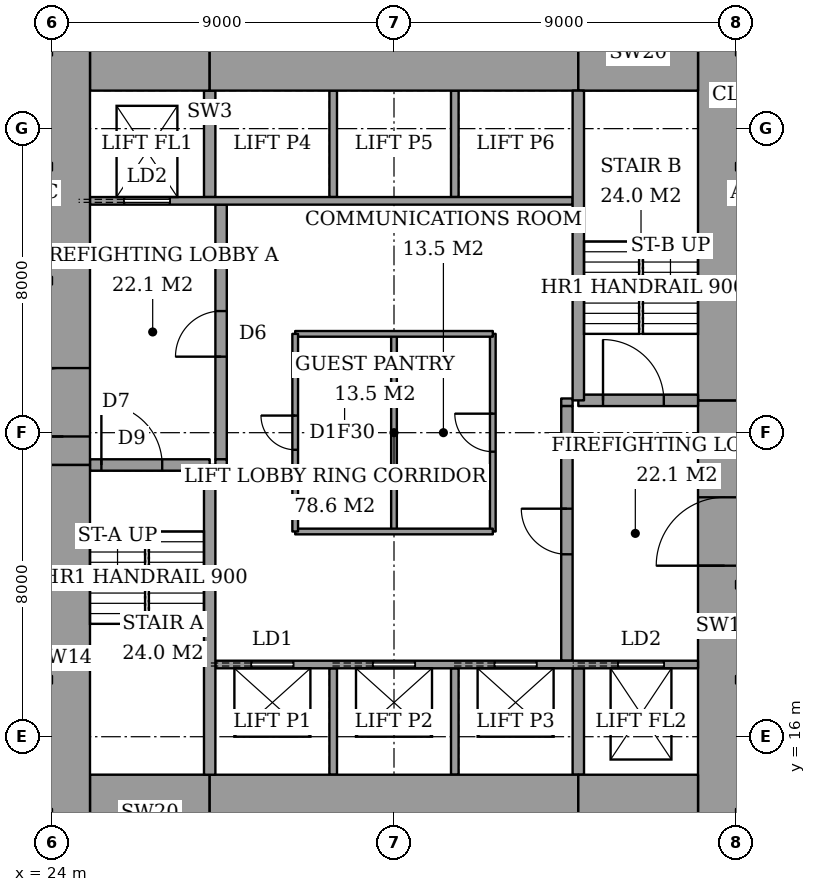
"""IFC4 building model, lengths in metres.
Left out: names, types, materials, properties, quantities, classifications, styles, units other than length and angle.
Written with IfcOpenShell. Run it as: python <this file> out.ifc"""

import sys

from ifc_helpers import new_model, si_unit, direction, frame, frame_2d, origin, place, context, subcontext, project, spatial, rectangle, extrude, element, fill, save


model = new_model("IFC4")
c1 = context("Model", 3, precision=1e-05, world=origin(), true_north=direction((0.0, 1.0)))
c2 = subcontext(c1, "Body", "Model", "MODEL_VIEW")
j1 = project(units=[si_unit("LENGTHUNIT", "METRE"), si_unit("PLANEANGLEUNIT", "RADIAN")], contexts=[c1])
p1 = place(None, origin())
s1 = spatial("IfcSite", under=j1, at=p1, CompositionType="ELEMENT")
p2 = place(p1, origin())
s2 = spatial("IfcBuilding", under=s1, at=p2, CompositionType="ELEMENT")
p3 = place(p2, frame((0.0, 0.0, 26.0)))
s3 = spatial("IfcBuildingStorey", under=s2, at=p3, CompositionType="ELEMENT", Elevation=26.0)
p4 = place(p3, frame((25.0, 14.0, 0.0), z_axis=(0.0, 0.0, 1.0), x_axis=(1.0, 0.0, 0.0)))
e1 = element("IfcWall", 1, at=p4, inside=s3, PredefinedType="SHEAR", context=c2, shape_type="SweptSolid", body=[
    extrude(rectangle(XDim=3.15, YDim=2.0, at=frame_2d((1.575, 0.0))), origin(), (0.0, 0.0, 1.0), 3.6),
])
p5 = place(p3, frame((28.15, 14.0, 0.0), z_axis=(0.0, 0.0, 1.0), x_axis=(1.0, 0.0, 0.0)))
e2 = element("IfcWall", 2, at=p5, inside=s3, PredefinedType="SHEAR", context=c2, shape_type="SweptSolid", body=[
    extrude(rectangle(XDim=9.7, YDim=2.0, at=frame_2d((4.85, 0.0))), origin(), (0.0, 0.0, 1.0), 3.6),
])
for number, where, z_axis, x_axis in (
    (3, (37.85, 14.0, 0.0), (0.0, 0.0, 1.0), (1.0, 0.0, 0.0)),
    (4, (25.0, 34.0, 0.0), (0.0, 0.0, 1.0), (1.0, 0.0, 0.0)),
):
    element("IfcWall", number, at=place(p3, frame(where, z_axis=z_axis, x_axis=x_axis)), inside=s3, PredefinedType="SHEAR", context=c2, shape_type="SweptSolid", body=[
        extrude(rectangle(XDim=3.15, YDim=2.0, at=frame_2d((1.575, 0.0))), origin(), (0.0, 0.0, 1.0), 3.6),
    ])
p6 = place(p3, frame((28.15, 34.0, 0.0), z_axis=(0.0, 0.0, 1.0), x_axis=(1.0, 0.0, 0.0)))
e5 = element("IfcWall", 5, at=p6, inside=s3, PredefinedType="SHEAR", context=c2, shape_type="SweptSolid", body=[
    extrude(rectangle(XDim=9.7, YDim=2.0, at=frame_2d((4.85, 0.0))), origin(), (0.0, 0.0, 1.0), 3.6),
])
p7 = place(p3, frame((37.85, 34.0, 0.0), z_axis=(0.0, 0.0, 1.0), x_axis=(1.0, 0.0, 0.0)))
e6 = element("IfcWall", 6, at=p7, inside=s3, PredefinedType="SHEAR", context=c2, shape_type="SweptSolid", body=[
    extrude(rectangle(XDim=3.15, YDim=2.0, at=frame_2d((1.575, 0.0))), origin(), (0.0, 0.0, 1.0), 3.6),
])
p8 = place(p3, frame((24.3, 13.0, 0.0), z_axis=(0.0, 0.0, 1.0), x_axis=(0.0, 1.0, 0.0)))
e7 = element("IfcWall", 7, at=p8, inside=s3, PredefinedType="SHEAR", context=c2, shape_type="SweptSolid", body=[
    extrude(rectangle(XDim=10.15, YDim=1.4, at=frame_2d((5.075, 0.0))), origin(), (0.0, 0.0, 1.0), 3.6),
])
p9 = place(p3, frame((24.3, 23.15, 0.0), z_axis=(0.0, 0.0, 1.0), x_axis=(0.0, 1.0, 0.0)))
e8 = element("IfcWall", 8, at=p9, inside=s3, PredefinedType="SHEAR", context=c2, shape_type="SweptSolid", body=[
    extrude(rectangle(XDim=11.85, YDim=1.4, at=frame_2d((5.925, 0.0))), origin(), (0.0, 0.0, 1.0), 3.6),
])
p10 = place(p9, frame((0.75, 0.0, 0.0)))
e9 = element("IfcOpeningElement", 9, at=p10, cuts=e8, PredefinedType="OPENING", context=c2, shape_type="SweptSolid", body=[
    extrude(rectangle(XDim=1.8, YDim=2.4, at=frame_2d((0.9, 1.2))), frame((0.0, 0.71, 0.0), z_axis=(0.0, -1.0, 0.0), x_axis=(1.0, 0.0, 0.0)), (0.0, 0.0, 1.0), 1.42),
])
p11 = place(p3, frame((41.7, 13.0, 0.0), z_axis=(0.0, 0.0, 1.0), x_axis=(0.0, 1.0, 0.0)))
e10 = element("IfcWall", 10, at=p11, inside=s3, PredefinedType="SHEAR", context=c2, shape_type="SweptSolid", body=[
    extrude(rectangle(XDim=11.85, YDim=1.4, at=frame_2d((5.925, 0.0))), origin(), (0.0, 0.0, 1.0), 3.6),
])
p12 = place(p11, frame((7.5, 0.0, 0.0)))
e11 = element("IfcOpeningElement", 11, at=p12, cuts=e10, PredefinedType="OPENING", context=c2, shape_type="SweptSolid", body=[
    extrude(rectangle(XDim=1.8, YDim=2.4, at=frame_2d((0.9, 1.2))), frame((0.0, 0.71, 0.0), z_axis=(0.0, -1.0, 0.0), x_axis=(1.0, 0.0, 0.0)), (0.0, 0.0, 1.0), 1.42),
])
p13 = place(p3, frame((41.7, 24.85, 0.0), z_axis=(0.0, 0.0, 1.0), x_axis=(0.0, 1.0, 0.0)))
e12 = element("IfcWall", 12, at=p13, inside=s3, PredefinedType="SHEAR", context=c2, shape_type="SweptSolid", body=[
    extrude(rectangle(XDim=10.15, YDim=1.4, at=frame_2d((5.075, 0.0))), origin(), (0.0, 0.0, 1.0), 3.6),
])
p14 = place(p3, frame((28.15, 15.0, 0.0), z_axis=(0.0, 0.0, 1.0), x_axis=(0.0, 1.0, 0.0)))
e13 = element("IfcWall", 13, at=p14, inside=s3, PredefinedType="SHEAR", context=c2, shape_type="SweptSolid", body=[
    extrude(rectangle(XDim=8.15, YDim=0.3, at=frame_2d((4.075, 0.0))), origin(), (0.0, 0.0, 1.0), 3.6),
])
p15 = place(p3, frame((25.0, 23.15, 0.0), z_axis=(0.0, 0.0, 1.0), x_axis=(1.0, 0.0, 0.0)))
e14 = element("IfcWall", 14, at=p15, inside=s3, PredefinedType="SHEAR", context=c2, shape_type="SweptSolid", body=[
    extrude(rectangle(XDim=3.15, YDim=0.3, at=frame_2d((1.575, 0.0))), origin(), (0.0, 0.0, 1.0), 3.6),
])
p16 = place(p15, frame((0.3, 0.0, 0.0)))
e15 = element("IfcOpeningElement", 15, at=p16, cuts=e14, PredefinedType="OPENING", context=c2, shape_type="SweptSolid", body=[
    extrude(rectangle(XDim=1.6, YDim=2.1, at=frame_2d((0.8, 1.05))), frame((0.0, 0.16, 0.0), z_axis=(0.0, -1.0, 0.0), x_axis=(1.0, 0.0, 0.0)), (0.0, 0.0, 1.0), 0.32),
])
p17 = place(p3, frame((37.85, 24.85, 0.0), z_axis=(0.0, 0.0, 1.0), x_axis=(0.0, 1.0, 0.0)))
e16 = element("IfcWall", 16, at=p17, inside=s3, PredefinedType="SHEAR", context=c2, shape_type="SweptSolid", body=[
    extrude(rectangle(XDim=8.15, YDim=0.3, at=frame_2d((4.075, 0.0))), origin(), (0.0, 0.0, 1.0), 3.6),
])
p18 = place(p3, frame((37.85, 24.85, 0.0), z_axis=(0.0, 0.0, 1.0), x_axis=(1.0, 0.0, 0.0)))
e17 = element("IfcWall", 17, at=p18, inside=s3, PredefinedType="SHEAR", context=c2, shape_type="SweptSolid", body=[
    extrude(rectangle(XDim=3.15, YDim=0.3, at=frame_2d((1.575, 0.0))), origin(), (0.0, 0.0, 1.0), 3.6),
])
p19 = place(p18, frame((0.65, 0.0, 0.0)))
e18 = element("IfcOpeningElement", 18, at=p19, cuts=e17, PredefinedType="OPENING", context=c2, shape_type="SweptSolid", body=[
    extrude(rectangle(XDim=1.6, YDim=2.1, at=frame_2d((0.8, 1.05))), frame((0.0, 0.16, 0.0), z_axis=(0.0, -1.0, 0.0), x_axis=(1.0, 0.0, 0.0)), (0.0, 0.0, 1.0), 0.32),
])
p20 = place(p3, frame((28.45, 23.3, 0.0), z_axis=(0.0, 0.0, 1.0), x_axis=(0.0, 1.0, 0.0)))
e19 = element("IfcWall", 19, at=p20, inside=s3, PredefinedType="PARTITIONING", context=c2, shape_type="SweptSolid", body=[
    extrude(rectangle(XDim=6.7, YDim=0.3, at=frame_2d((3.35, 0.0))), origin(), (0.0, 0.0, 1.0), 3.6),
])
p21 = place(p20, frame((2.7, 0.0, 0.0)))
e20 = element("IfcOpeningElement", 20, at=p21, cuts=e19, PredefinedType="OPENING", context=c2, shape_type="SweptSolid", body=[
    extrude(rectangle(XDim=1.2, YDim=2.1, at=frame_2d((0.6, 1.05))), frame((0.0, 0.16, 0.0), z_axis=(0.0, -1.0, 0.0), x_axis=(1.0, 0.0, 0.0)), (0.0, 0.0, 1.0), 0.32),
])
p22 = place(p3, frame((37.55, 18.0, 0.0), z_axis=(0.0, 0.0, 1.0), x_axis=(0.0, 1.0, 0.0)))
e21 = element("IfcWall", 21, at=p22, inside=s3, PredefinedType="PARTITIONING", context=c2, shape_type="SweptSolid", body=[
    extrude(rectangle(XDim=6.7, YDim=0.3, at=frame_2d((3.35, 0.0))), origin(), (0.0, 0.0, 1.0), 3.6),
])
p23 = place(p22, frame((2.8, 0.0, 0.0)))
e22 = element("IfcOpeningElement", 22, at=p23, cuts=e21, PredefinedType="OPENING", context=c2, shape_type="SweptSolid", body=[
    extrude(rectangle(XDim=1.2, YDim=2.1, at=frame_2d((0.6, 1.05))), frame((0.0, 0.16, 0.0), z_axis=(0.0, -1.0, 0.0), x_axis=(1.0, 0.0, 0.0)), (0.0, 0.0, 1.0), 0.32),
])
p24 = place(p3, frame((28.3, 17.9, 0.0), z_axis=(0.0, 0.0, 1.0), x_axis=(1.0, 0.0, 0.0)))
e23 = element("IfcWall", 23, at=p24, inside=s3, PredefinedType="PARTITIONING", context=c2, shape_type="SweptSolid", body=[
    extrude(rectangle(XDim=12.7, YDim=0.2, at=frame_2d((6.35, 0.0))), origin(), (0.0, 0.0, 1.0), 3.6),
])
p25 = place(p24, frame((0.95, 0.0, 0.0)))
e24 = element("IfcOpeningElement", 24, at=p25, cuts=e23, PredefinedType="OPENING", context=c2, shape_type="SweptSolid", body=[
    extrude(rectangle(XDim=1.1, YDim=2.1, at=frame_2d((0.55, 1.05))), frame((0.0, 0.11, 0.0), z_axis=(0.0, -1.0, 0.0), x_axis=(1.0, 0.0, 0.0)), (0.0, 0.0, 1.0), 0.22),
])
p26 = place(p24, frame((4.15, 0.0, 0.0)))
e25 = element("IfcOpeningElement", 25, at=p26, cuts=e23, PredefinedType="OPENING", context=c2, shape_type="SweptSolid", body=[
    extrude(rectangle(XDim=1.1, YDim=2.1, at=frame_2d((0.55, 1.05))), frame((0.0, 0.11, 0.0), z_axis=(0.0, -1.0, 0.0), x_axis=(1.0, 0.0, 0.0)), (0.0, 0.0, 1.0), 0.22),
])
p27 = place(p24, frame((7.35, 0.0, 0.0)))
e26 = element("IfcOpeningElement", 26, at=p27, cuts=e23, PredefinedType="OPENING", context=c2, shape_type="SweptSolid", body=[
    extrude(rectangle(XDim=1.1, YDim=2.1, at=frame_2d((0.55, 1.05))), frame((0.0, 0.11, 0.0), z_axis=(0.0, -1.0, 0.0), x_axis=(1.0, 0.0, 0.0)), (0.0, 0.0, 1.0), 0.22),
])
p28 = place(p24, frame((10.6, 0.0, 0.0)))
e27 = element("IfcOpeningElement", 27, at=p28, cuts=e23, PredefinedType="OPENING", context=c2, shape_type="SweptSolid", body=[
    extrude(rectangle(XDim=1.2, YDim=2.1, at=frame_2d((0.6, 1.05))), frame((0.0, 0.11, 0.0), z_axis=(0.0, -1.0, 0.0), x_axis=(1.0, 0.0, 0.0)), (0.0, 0.0, 1.0), 0.22),
])
p29 = place(p3, frame((25.0, 30.1, 0.0), z_axis=(0.0, 0.0, 1.0), x_axis=(1.0, 0.0, 0.0)))
e28 = element("IfcWall", 28, at=p29, inside=s3, PredefinedType="PARTITIONING", context=c2, shape_type="SweptSolid", body=[
    extrude(rectangle(XDim=12.7, YDim=0.2, at=frame_2d((6.35, 0.0))), origin(), (0.0, 0.0, 1.0), 3.6),
])
p30 = place(p29, frame((0.9, 0.0, 0.0)))
e29 = element("IfcOpeningElement", 29, at=p30, cuts=e28, PredefinedType="OPENING", context=c2, shape_type="SweptSolid", body=[
    extrude(rectangle(XDim=1.2, YDim=2.1, at=frame_2d((0.6, 1.05))), frame((0.0, 0.11, 0.0), z_axis=(0.0, -1.0, 0.0), x_axis=(1.0, 0.0, 0.0)), (0.0, 0.0, 1.0), 0.22),
])
for number, where, z_axis, x_axis in (
    (30, (31.4, 15.0, 0.0), (0.0, 0.0, 1.0), (0.0, 1.0, 0.0)),
    (31, (34.6, 15.0, 0.0), (0.0, 0.0, 1.0), (0.0, 1.0, 0.0)),
):
    element("IfcWall", number, at=place(p3, frame(where, z_axis=z_axis, x_axis=x_axis)), inside=s3, PredefinedType="PARTITIONING", context=c2, shape_type="SweptSolid", body=[
        extrude(rectangle(XDim=2.8, YDim=0.2, at=frame_2d((1.4, 0.0))), origin(), (0.0, 0.0, 1.0), 3.6),
    ])
p31 = place(p3, frame((37.85, 15.0, 0.0), z_axis=(0.0, 0.0, 1.0), x_axis=(0.0, 1.0, 0.0)))
e32 = element("IfcWall", 32, at=p31, inside=s3, PredefinedType="SHEAR", context=c2, shape_type="SweptSolid", body=[
    extrude(rectangle(XDim=2.8, YDim=0.3, at=frame_2d((1.4, 0.0))), origin(), (0.0, 0.0, 1.0), 3.6),
])
for number, where, z_axis, x_axis in (
    (33, (31.4, 30.2, 0.0), (0.0, 0.0, 1.0), (0.0, 1.0, 0.0)),
    (34, (34.6, 30.2, 0.0), (0.0, 0.0, 1.0), (0.0, 1.0, 0.0)),
):
    element("IfcWall", number, at=place(p3, frame(where, z_axis=z_axis, x_axis=x_axis)), inside=s3, PredefinedType="PARTITIONING", context=c2, shape_type="SweptSolid", body=[
        extrude(rectangle(XDim=2.8, YDim=0.2, at=frame_2d((1.4, 0.0))), origin(), (0.0, 0.0, 1.0), 3.6),
    ])
p32 = place(p3, frame((28.15, 30.2, 0.0), z_axis=(0.0, 0.0, 1.0), x_axis=(0.0, 1.0, 0.0)))
e35 = element("IfcWall", 35, at=p32, inside=s3, PredefinedType="SHEAR", context=c2, shape_type="SweptSolid", body=[
    extrude(rectangle(XDim=2.8, YDim=0.3, at=frame_2d((1.4, 0.0))), origin(), (0.0, 0.0, 1.0), 3.6),
])
for number, where, z_axis, x_axis in (
    (36, (28.3, 23.2, 0.0), (0.0, 0.0, 1.0), (1.0, 0.0, 0.0)),
    (37, (37.4, 24.8, 0.0), (0.0, 0.0, 1.0), (1.0, 0.0, 0.0)),
):
    element("IfcWall", number, at=place(p3, frame(where, z_axis=z_axis, x_axis=x_axis)), inside=s3, PredefinedType="PARTITIONING", context=c2, shape_type="SweptSolid", body=[
        extrude(rectangle(XDim=0.3, YDim=0.2, at=frame_2d((0.15, 0.0))), origin(), (0.0, 0.0, 1.0), 3.6),
    ])
for number, where, z_axis, x_axis in (
    (38, (30.4, 21.4, 0.0), (0.0, 0.0, 1.0), (1.0, 0.0, 0.0)),
    (39, (30.4, 26.6, 0.0), (0.0, 0.0, 1.0), (1.0, 0.0, 0.0)),
):
    element("IfcWall", number, at=place(p3, frame(where, z_axis=z_axis, x_axis=x_axis)), inside=s3, PredefinedType="PARTITIONING", context=c2, shape_type="SweptSolid", body=[
        extrude(rectangle(XDim=5.2, YDim=0.15, at=frame_2d((2.6, 0.0))), origin(), (0.0, 0.0, 1.0), 3.35),
    ])
p33 = place(p3, frame((30.4, 21.4, 0.0), z_axis=(0.0, 0.0, 1.0), x_axis=(0.0, 1.0, 0.0)))
e40 = element("IfcWall", 40, at=p33, inside=s3, PredefinedType="PARTITIONING", context=c2, shape_type="SweptSolid", body=[
    extrude(rectangle(XDim=5.2, YDim=0.15, at=frame_2d((2.6, 0.0))), origin(), (0.0, 0.0, 1.0), 3.35),
])
p34 = place(p33, frame((2.15, 0.0, 0.0)))
e41 = element("IfcOpeningElement", 41, at=p34, cuts=e40, PredefinedType="OPENING", context=c2, shape_type="SweptSolid", body=[
    extrude(rectangle(XDim=0.9, YDim=2.1, at=frame_2d((0.45, 1.05))), frame((0.0, 0.085, 0.0), z_axis=(0.0, -1.0, 0.0), x_axis=(1.0, 0.0, 0.0)), (0.0, 0.0, 1.0), 0.17),
])
p35 = place(p3, frame((35.6, 21.4, 0.0), z_axis=(0.0, 0.0, 1.0), x_axis=(0.0, 1.0, 0.0)))
e42 = element("IfcWall", 42, at=p35, inside=s3, PredefinedType="PARTITIONING", context=c2, shape_type="SweptSolid", body=[
    extrude(rectangle(XDim=5.2, YDim=0.15, at=frame_2d((2.6, 0.0))), origin(), (0.0, 0.0, 1.0), 3.35),
])
p36 = place(p35, frame((2.1, 0.0, 0.0)))
e43 = element("IfcOpeningElement", 43, at=p36, cuts=e42, PredefinedType="OPENING", context=c2, shape_type="SweptSolid", body=[
    extrude(rectangle(XDim=1.0, YDim=2.1, at=frame_2d((0.5, 1.05))), frame((0.0, 0.085, 0.0), z_axis=(0.0, -1.0, 0.0), x_axis=(1.0, 0.0, 0.0)), (0.0, 0.0, 1.0), 0.17),
])
p37 = place(p3, frame((33.0, 21.4, 0.0), z_axis=(0.0, 0.0, 1.0), x_axis=(0.0, 1.0, 0.0)))
e44 = element("IfcWall", 44, at=p37, inside=s3, PredefinedType="PARTITIONING", context=c2, shape_type="SweptSolid", body=[
    extrude(rectangle(XDim=5.2, YDim=0.15, at=frame_2d((2.6, 0.0))), origin(), (0.0, 0.0, 1.0), 3.35),
])
p38 = place(p16, origin())
e45 = element("IfcDoor", 45, at=p38, inside=s3, OperationType="DOUBLE_DOOR_SINGLE_SWING", PredefinedType="DOOR", context=c2, shape_type="SweptSolid", body=[
    extrude(rectangle(XDim=1.6, YDim=2.1, at=frame_2d((0.8, 1.05))), frame((0.0, 0.025, 0.0), z_axis=(0.0, -1.0, 0.0), x_axis=(1.0, 0.0, 0.0)), (0.0, 0.0, 1.0), 0.05),
])
fill(e15, e45)
p39 = place(p19, origin())
e46 = element("IfcDoor", 46, at=p39, inside=s3, OperationType="DOUBLE_DOOR_SINGLE_SWING", PredefinedType="DOOR", context=c2, shape_type="SweptSolid", body=[
    extrude(rectangle(XDim=1.6, YDim=2.1, at=frame_2d((0.8, 1.05))), frame((0.0, 0.025, 0.0), z_axis=(0.0, -1.0, 0.0), x_axis=(1.0, 0.0, 0.0)), (0.0, 0.0, 1.0), 0.05),
])
fill(e18, e46)
p40 = place(p21, origin())
e47 = element("IfcDoor", 47, at=p40, inside=s3, OperationType="SINGLE_SWING_RIGHT", PredefinedType="DOOR", context=c2, shape_type="SweptSolid", body=[
    extrude(rectangle(XDim=1.2, YDim=2.1, at=frame_2d((0.6, 1.05))), frame((0.0, 0.025, 0.0), z_axis=(0.0, -1.0, 0.0), x_axis=(1.0, 0.0, 0.0)), (0.0, 0.0, 1.0), 0.05),
])
fill(e20, e47)
p41 = place(p23, origin())
e48 = element("IfcDoor", 48, at=p41, inside=s3, OperationType="SINGLE_SWING_LEFT", PredefinedType="DOOR", context=c2, shape_type="SweptSolid", body=[
    extrude(rectangle(XDim=1.2, YDim=2.1, at=frame_2d((0.6, 1.05))), frame((0.0, 0.025, 0.0), z_axis=(0.0, -1.0, 0.0), x_axis=(1.0, 0.0, 0.0)), (0.0, 0.0, 1.0), 0.05),
])
fill(e22, e48)
p42 = place(p10, origin())
e49 = element("IfcDoor", 49, at=p42, inside=s3, OperationType="DOUBLE_DOOR_DOUBLE_SWING", PredefinedType="DOOR", context=c2, shape_type="SweptSolid", body=[
    extrude(rectangle(XDim=1.8, YDim=2.4, at=frame_2d((0.9, 1.2))), frame((0.0, 0.025, 0.0), z_axis=(0.0, -1.0, 0.0), x_axis=(1.0, 0.0, 0.0)), (0.0, 0.0, 1.0), 0.05),
])
fill(e9, e49)
p43 = place(p12, origin())
e50 = element("IfcDoor", 50, at=p43, inside=s3, OperationType="DOUBLE_DOOR_DOUBLE_SWING", PredefinedType="DOOR", context=c2, shape_type="SweptSolid", body=[
    extrude(rectangle(XDim=1.8, YDim=2.4, at=frame_2d((0.9, 1.2))), frame((0.0, 0.025, 0.0), z_axis=(0.0, -1.0, 0.0), x_axis=(1.0, 0.0, 0.0)), (0.0, 0.0, 1.0), 0.05),
])
fill(e11, e50)
p44 = place(p34, origin())
e51 = element("IfcDoor", 51, at=p44, inside=s3, OperationType="SINGLE_SWING_LEFT", PredefinedType="DOOR", context=c2, shape_type="SweptSolid", body=[
    extrude(rectangle(XDim=0.9, YDim=2.1, at=frame_2d((0.45, 1.05))), frame((0.0, 0.025, 0.0), z_axis=(0.0, -1.0, 0.0), x_axis=(1.0, 0.0, 0.0)), (0.0, 0.0, 1.0), 0.05),
])
fill(e41, e51)
p45 = place(p36, origin())
e52 = element("IfcDoor", 52, at=p45, inside=s3, OperationType="SINGLE_SWING_LEFT", PredefinedType="DOOR", context=c2, shape_type="SweptSolid", body=[
    extrude(rectangle(XDim=1.0, YDim=2.1, at=frame_2d((0.5, 1.05))), frame((0.0, 0.025, 0.0), z_axis=(0.0, -1.0, 0.0), x_axis=(1.0, 0.0, 0.0)), (0.0, 0.0, 1.0), 0.05),
])
fill(e43, e52)
p46 = place(p25, origin())
e53 = element("IfcDoor", 53, at=p46, inside=s3, OperationType="SLIDING_TO_LEFT", PredefinedType="DOOR", context=c2, shape_type="SweptSolid", body=[
    extrude(rectangle(XDim=1.1, YDim=2.1, at=frame_2d((0.55, 1.05))), frame((0.0, 0.025, 0.0), z_axis=(0.0, -1.0, 0.0), x_axis=(1.0, 0.0, 0.0)), (0.0, 0.0, 1.0), 0.05),
])
fill(e24, e53)
p47 = place(p26, origin())
e54 = element("IfcDoor", 54, at=p47, inside=s3, OperationType="SLIDING_TO_LEFT", PredefinedType="DOOR", context=c2, shape_type="SweptSolid", body=[
    extrude(rectangle(XDim=1.1, YDim=2.1, at=frame_2d((0.55, 1.05))), frame((0.0, 0.025, 0.0), z_axis=(0.0, -1.0, 0.0), x_axis=(1.0, 0.0, 0.0)), (0.0, 0.0, 1.0), 0.05),
])
fill(e25, e54)
p48 = place(p27, origin())
e55 = element("IfcDoor", 55, at=p48, inside=s3, OperationType="SLIDING_TO_LEFT", PredefinedType="DOOR", context=c2, shape_type="SweptSolid", body=[
    extrude(rectangle(XDim=1.1, YDim=2.1, at=frame_2d((0.55, 1.05))), frame((0.0, 0.025, 0.0), z_axis=(0.0, -1.0, 0.0), x_axis=(1.0, 0.0, 0.0)), (0.0, 0.0, 1.0), 0.05),
])
fill(e26, e55)
p49 = place(p30, origin())
e56 = element("IfcDoor", 56, at=p49, inside=s3, OperationType="SLIDING_TO_LEFT", PredefinedType="DOOR", context=c2, shape_type="SweptSolid", body=[
    extrude(rectangle(XDim=1.2, YDim=2.1, at=frame_2d((0.6, 1.05))), frame((0.0, 0.025, 0.0), z_axis=(0.0, -1.0, 0.0), x_axis=(1.0, 0.0, 0.0)), (0.0, 0.0, 1.0), 0.05),
])
fill(e29, e56)
p50 = place(p28, origin())
e57 = element("IfcDoor", 57, at=p50, inside=s3, OperationType="SLIDING_TO_LEFT", PredefinedType="DOOR", context=c2, shape_type="SweptSolid", body=[
    extrude(rectangle(XDim=1.2, YDim=2.1, at=frame_2d((0.6, 1.05))), frame((0.0, 0.025, 0.0), z_axis=(0.0, -1.0, 0.0), x_axis=(1.0, 0.0, 0.0)), (0.0, 0.0, 1.0), 0.05),
])
fill(e27, e57)
save(model, sys.argv[1])
